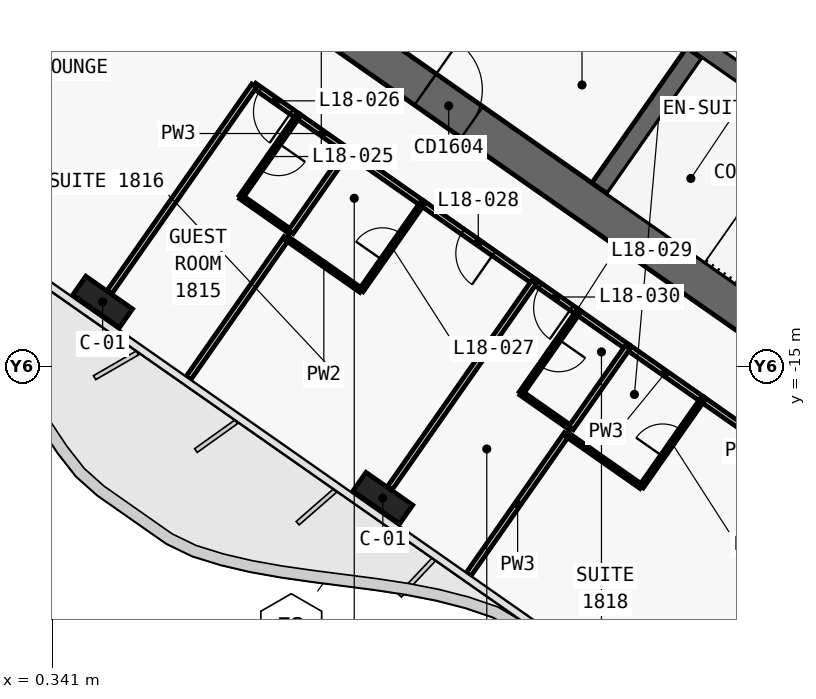
"""IFC4 building model, lengths in metres.
Left out: names, types, materials, properties, quantities, classifications, styles, units other than length and angle.
Written with IfcOpenShell. Run it as: python <this file> out.ifc"""

import sys

from ifc_helpers import new_model, si_unit, direction, frame, frame_2d, origin, origin_2d, place, context, subcontext, project, spatial, polyline, rectangle, outline, extrude, element, fill, save


model = new_model("IFC4")
c1 = context("Model", 3, precision=1e-05, world=origin(), true_north=direction((0.0, 1.0)))
c2 = subcontext(c1, "Body", "Model", "MODEL_VIEW")
j1 = project(units=[si_unit("LENGTHUNIT", "METRE"), si_unit("PLANEANGLEUNIT", "RADIAN")], contexts=[c1])
p1 = place(None, origin())
s1 = spatial("IfcSite", under=j1, at=p1, CompositionType="ELEMENT")
p2 = place(p1, origin())
s2 = spatial("IfcBuilding", under=s1, at=p2, CompositionType="ELEMENT")
p3 = place(p2, frame((0.0, 0.0, 90.5)))
s3 = spatial("IfcBuildingStorey", under=s2, at=p3, CompositionType="ELEMENT", Elevation=90.5)
p4 = place(p3, frame((-0.037, 11.867, 0.0), z_axis=(0.0, 0.0, 1.0), x_axis=(0.819155306259, -0.573571777746, 0.0)))
e1 = element("IfcWall", 1, at=p4, inside=s3, PredefinedType="SHEAR", context=c2, shape_type="SweptSolid", body=[
    extrude(outline(polyline([(33.837, 0.5), (0.0, 0.5), (0.7, -0.5), (33.837, -0.5), (33.837, 0.5)])), origin(), (0.0, 0.0, 1.0), 3.6),
])
p5 = place(p3, frame((-0.037, -0.585, 0.0), z_axis=(0.0, 0.0, 1.0), x_axis=(0.819157152511, -0.573569140985, 0.0)))
e2 = element("IfcWall", 2, at=p5, inside=s3, PredefinedType="SHEAR", context=c2, shape_type="SweptSolid", body=[
    extrude(outline(polyline([(26.695, 0.5), (0.0, 0.5), (0.7, -0.5), (26.695, -0.5), (26.695, 0.5)])), origin(), (0.0, 0.0, 1.0), 3.6),
])
p6 = place(p5, frame((1.045, 0.0, 0.0)))
e3 = element("IfcOpeningElement", 3, at=p6, cuts=e2, PredefinedType="OPENING", context=c2, shape_type="SweptSolid", body=[
    extrude(rectangle(XDim=1.5, YDim=2.1, at=frame_2d((0.75, 1.05))), frame((0.0, 0.51, 0.0), z_axis=(0.0, -1.0, 0.0), x_axis=(1.0, 0.0, 0.0)), (0.0, 0.0, 1.0), 1.02),
])
p7 = place(p5, frame((12.445, 0.0, 0.0)))
e4 = element("IfcOpeningElement", 4, at=p7, cuts=e2, PredefinedType="OPENING", context=c2, shape_type="SweptSolid", body=[
    extrude(rectangle(XDim=1.5, YDim=2.1, at=frame_2d((0.75, 1.05))), frame((0.0, 0.51, 0.0), z_axis=(0.0, -1.0, 0.0), x_axis=(1.0, 0.0, 0.0)), (0.0, 0.0, 1.0), 1.02),
])
p8 = place(p3, frame((14.745, -10.324, 0.0), z_axis=(0.0, 0.0, 1.0), x_axis=(0.57356780395, 0.819158088694, 0.0)))
e5 = element("IfcWall", 5, at=p8, inside=s3, PredefinedType="SHEAR", context=c2, shape_type="SweptSolid", body=[
    extrude(outline(polyline([(0.0, 0.25), (0.0, -0.25), (4.35, -0.25), (4.35, 0.25), (0.0, 0.25)])), origin(), (0.0, 0.0, 1.0), 3.6),
])
p9 = place(p3, frame((2.638, 3.768, 0.0), z_axis=(0.0, 0.0, 1.0), x_axis=(0.819148977158, -0.573580816643, 0.0)))
e6 = element("IfcWall", 6, at=p9, inside=s3, PredefinedType="SHEAR", context=c2, shape_type="SweptSolid", body=[
    extrude(outline(polyline([(0.0, 0.25), (0.0, -0.25), (26.0, -0.25), (26.0, 0.25), (0.0, 0.25)])), origin(), (0.0, 0.0, 1.0), 3.6),
])
p10 = place(p9, frame((9.637, 0.0, 0.0)))
e7 = element("IfcOpeningElement", 7, at=p10, cuts=e6, PredefinedType="OPENING", context=c2, shape_type="SweptSolid", body=[
    extrude(rectangle(XDim=1.2, YDim=2.1, at=frame_2d((0.6, 1.05))), frame((0.0, 0.26, 0.0), z_axis=(0.0, -1.0, 0.0), x_axis=(1.0, 0.0, 0.0)), (0.0, 0.0, 1.0), 0.52),
])
p11 = place(p9, frame((11.812, 0.0, 0.0)))
e8 = element("IfcOpeningElement", 8, at=p11, cuts=e6, PredefinedType="OPENING", context=c2, shape_type="SweptSolid", body=[
    extrude(rectangle(XDim=1.2, YDim=2.1, at=frame_2d((0.6, 1.05))), frame((0.0, 0.26, 0.0), z_axis=(0.0, -1.0, 0.0), x_axis=(1.0, 0.0, 0.0)), (0.0, 0.0, 1.0), 0.52),
])
p12 = place(p9, frame((13.988, 0.0, 0.0)))
e9 = element("IfcOpeningElement", 9, at=p12, cuts=e6, PredefinedType="OPENING", context=c2, shape_type="SweptSolid", body=[
    extrude(rectangle(XDim=1.2, YDim=2.1, at=frame_2d((0.6, 1.05))), frame((0.0, 0.26, 0.0), z_axis=(0.0, -1.0, 0.0), x_axis=(1.0, 0.0, 0.0)), (0.0, 0.0, 1.0), 0.52),
])
p13 = place(p9, frame((16.262, 0.0, 0.0)))
e10 = element("IfcOpeningElement", 10, at=p13, cuts=e6, PredefinedType="OPENING", context=c2, shape_type="SweptSolid", body=[
    extrude(rectangle(XDim=1.0, YDim=2.1, at=frame_2d((0.5, 1.05))), frame((0.0, 0.26, 0.0), z_axis=(0.0, -1.0, 0.0), x_axis=(1.0, 0.0, 0.0)), (0.0, 0.0, 1.0), 0.52),
])
for number, where, z_axis, x_axis in (
    (11, (1.665, -13.313, 0.0), (0.0, 0.0, 1.0), (0.819, -0.574, 0.0)),
    (12, (9.038, -18.475, 0.0), (0.0, 0.0, 1.0), (0.819, -0.574, 0.0)),
):
    element("IfcColumn", number, at=place(p3, frame(where, z_axis=z_axis, x_axis=x_axis)), inside=s3, PredefinedType="COLUMN", context=c2, shape_type="SweptSolid", body=[
        extrude(rectangle(XDim=1.5, YDim=0.6, at=origin_2d()), origin(), (0.0, 0.0, 1.0), 3.6),
    ])
p14 = place(p3, frame((6.799, -8.423, 0.0), z_axis=(0.0, 0.0, 1.0), x_axis=(-0.819207359301, 0.573497430219, 0.0)))
e13 = element("IfcWall", 13, at=p14, inside=s3, PredefinedType="PARTITIONING", context=c2, shape_type="SweptSolid", body=[
    extrude(rectangle(XDim=1.401, YDim=0.15, at=frame_2d((0.7, 0.0))), origin(), (0.0, 0.0, 1.0), 2.6),
])
p15 = place(p14, frame((0.201, 0.0, 0.0)))
e14 = element("IfcOpeningElement", 14, at=p15, cuts=e13, PredefinedType="OPENING", context=c2, shape_type="SweptSolid", body=[
    extrude(rectangle(XDim=1.0, YDim=2.1, at=frame_2d((0.5, 1.05))), frame((0.0, 0.085, 0.0), z_axis=(0.0, -1.0, 0.0), x_axis=(1.0, 0.0, 0.0)), (0.0, 0.0, 1.0), 0.17),
])
p16 = place(p3, frame((8.111, -9.342, 0.0), z_axis=(0.0, 0.0, 1.0), x_axis=(-0.8190674132, 0.573697283098, 0.0)))
e15 = element("IfcWall", 15, at=p16, inside=s3, PredefinedType="PARTITIONING", context=c2, shape_type="SweptSolid", body=[
    extrude(rectangle(XDim=1.604, YDim=0.15, at=frame_2d((0.802, 0.0))), origin(), (0.0, 0.0, 1.0), 3.32),
])
p17 = place(p3, frame((13.026, -12.783, 0.0), z_axis=(0.0, 0.0, 1.0), x_axis=(-0.819145961204, 0.573585123798, 0.0)))
e16 = element("IfcWall", 16, at=p17, inside=s3, PredefinedType="PARTITIONING", context=c2, shape_type="SweptSolid", body=[
    extrude(rectangle(XDim=3.603, YDim=0.15, at=frame_2d((1.802, 0.0))), origin(), (0.0, 0.0, 1.0), 2.6),
])
p18 = place(p17, frame((1.302, 0.0, 0.0)))
e17 = element("IfcOpeningElement", 17, at=p18, cuts=e16, PredefinedType="OPENING", context=c2, shape_type="SweptSolid", body=[
    extrude(rectangle(XDim=1.0, YDim=2.1, at=frame_2d((0.5, 1.05))), frame((0.0, 0.085, 0.0), z_axis=(0.0, -1.0, 0.0), x_axis=(1.0, 0.0, 0.0)), (0.0, 0.0, 1.0), 0.17),
])
p19 = place(p3, frame((10.077, -10.718, 0.0), z_axis=(0.0, 0.0, 1.0), x_axis=(-0.819146032251, 0.573585022335, 0.0)))
e18 = element("IfcWall", 18, at=p19, inside=s3, PredefinedType="PARTITIONING", context=c2, shape_type="SweptSolid", body=[
    extrude(rectangle(XDim=2.404, YDim=0.15, at=frame_2d((1.202, 0.0))), origin(), (0.0, 0.0, 1.0), 3.32),
])
p20 = place(p3, frame((14.172, -13.585, 0.0), z_axis=(0.0, 0.0, 1.0), x_axis=(-0.81914197737, 0.573590813132, 0.0)))
e19 = element("IfcWall", 19, at=p20, inside=s3, PredefinedType="PARTITIONING", context=c2, shape_type="SweptSolid", body=[
    extrude(rectangle(XDim=1.403, YDim=0.15, at=frame_2d((0.701, 0.0))), origin(), (0.0, 0.0, 1.0), 2.6),
])
p21 = place(p20, frame((0.201, 0.0, 0.0)))
e20 = element("IfcOpeningElement", 20, at=p21, cuts=e19, PredefinedType="OPENING", context=c2, shape_type="SweptSolid", body=[
    extrude(rectangle(XDim=1.0, YDim=2.1, at=frame_2d((0.5, 1.05))), frame((0.0, 0.085, 0.0), z_axis=(0.0, -1.0, 0.0), x_axis=(1.0, 0.0, 0.0)), (0.0, 0.0, 1.0), 0.17),
])
p22 = place(p3, frame((15.483, -14.504, 0.0), z_axis=(0.0, 0.0, 1.0), x_axis=(-0.819189013667, 0.573523634986, 0.0)))
e21 = element("IfcWall", 21, at=p22, inside=s3, PredefinedType="PARTITIONING", context=c2, shape_type="SweptSolid", body=[
    extrude(rectangle(XDim=1.604, YDim=0.15, at=frame_2d((0.802, 0.0))), origin(), (0.0, 0.0, 1.0), 3.32),
])
p23 = place(p3, frame((22.855, -19.666, 0.0), z_axis=(0.0, 0.0, 1.0), x_axis=(-0.819153746897, 0.573574004767, 0.0)))
e22 = element("IfcWall", 22, at=p23, inside=s3, PredefinedType="PARTITIONING", context=c2, shape_type="SweptSolid", body=[
    extrude(rectangle(XDim=6.603, YDim=0.15, at=frame_2d((3.302, 0.0))), origin(), (0.0, 0.0, 1.0), 2.6),
])
p24 = place(p23, frame((2.802, 0.0, 0.0)))
e23 = element("IfcOpeningElement", 23, at=p24, cuts=e22, PredefinedType="OPENING", context=c2, shape_type="SweptSolid", body=[
    extrude(rectangle(XDim=1.0, YDim=2.1, at=frame_2d((0.5, 1.05))), frame((0.0, 0.085, 0.0), z_axis=(0.0, -1.0, 0.0), x_axis=(1.0, 0.0, 0.0)), (0.0, 0.0, 1.0), 0.17),
])
p25 = place(p3, frame((17.449, -15.88, 0.0), z_axis=(0.0, 0.0, 1.0), x_axis=(-0.819179439794, 0.573537309527, 0.0)))
e24 = element("IfcWall", 24, at=p25, inside=s3, PredefinedType="PARTITIONING", context=c2, shape_type="SweptSolid", body=[
    extrude(rectangle(XDim=2.404, YDim=0.15, at=frame_2d((1.202, 0.0))), origin(), (0.0, 0.0, 1.0), 3.32),
])
p26 = place(p3, frame((6.798, -8.422, 0.0), z_axis=(0.0, 0.0, 1.0), x_axis=(-0.573537965655, -0.819178980414, 0.0)))
e25 = element("IfcWall", 25, at=p26, inside=s3, PredefinedType="PARTITIONING", context=c2, shape_type="SweptSolid", body=[
    extrude(rectangle(XDim=2.6, YDim=0.12, at=frame_2d((1.3, 0.0))), origin(), (0.0, 0.0, 1.0), 3.32),
])
p27 = place(p26, frame((0.875, 0.0, 0.0)))
e26 = element("IfcOpeningElement", 26, at=p27, cuts=e25, PredefinedType="OPENING", context=c2, shape_type="SweptSolid", body=[
    extrude(rectangle(XDim=0.85, YDim=2.05, at=frame_2d((0.425, 1.025))), frame((0.0, 0.07, 0.0), z_axis=(0.0, -1.0, 0.0), x_axis=(1.0, 0.0, 0.0)), (0.0, 0.0, 1.0), 0.14),
])
p28 = place(p3, frame((5.307, -10.553, 0.0), z_axis=(0.0, 0.0, 1.0), x_axis=(0.819131543282, -0.57360571371, 0.0)))
e27 = element("IfcWall", 27, at=p28, inside=s3, PredefinedType="PARTITIONING", context=c2, shape_type="SweptSolid", body=[
    extrude(rectangle(XDim=1.6, YDim=0.12, at=frame_2d((0.8, 0.0))), origin(), (0.0, 0.0, 1.0), 3.32),
])
p29 = place(p3, frame((6.504, -11.633, 0.0), z_axis=(0.0, 0.0, 1.0), x_axis=(-0.573556991349, -0.819165659482, 0.0)))
e28 = element("IfcWall", 28, at=p29, inside=s3, PredefinedType="PARTITIONING", context=c2, shape_type="SweptSolid", body=[
    extrude(rectangle(XDim=4.501, YDim=0.15, at=frame_2d((2.25, 0.0))), origin(), (0.0, 0.0, 1.0), 2.5),
])
p30 = place(p3, frame((1.849, -13.051, 0.0), z_axis=(0.0, 0.0, 1.0), x_axis=(0.57357355307, 0.819154063177, 0.0)))
e29 = element("IfcWall", 29, at=p30, inside=s3, PredefinedType="PARTITIONING", context=c2, shape_type="SweptSolid", body=[
    extrude(rectangle(XDim=6.63, YDim=0.15, at=frame_2d((3.315, 0.0))), origin(), (0.0, 0.0, 1.0), 2.6),
])
p31 = place(p3, frame((8.109, -9.34, 0.0), z_axis=(0.0, 0.0, 1.0), x_axis=(-0.573537965655, -0.819178980414, 0.0)))
e30 = element("IfcWall", 30, at=p31, inside=s3, PredefinedType="PARTITIONING", context=c2, shape_type="SweptSolid", body=[
    extrude(rectangle(XDim=2.6, YDim=0.15, at=frame_2d((1.3, 0.0))), origin(), (0.0, 0.0, 1.0), 3.32),
])
p32 = place(p3, frame((6.502, -11.635, 0.0), z_axis=(0.0, 0.0, 1.0), x_axis=(0.819141114317, -0.573592045652, 0.0)))
e31 = element("IfcWall", 31, at=p32, inside=s3, PredefinedType="PARTITIONING", context=c2, shape_type="SweptSolid", body=[
    extrude(rectangle(XDim=2.4, YDim=0.12, at=frame_2d((1.2, 0.0))), origin(), (0.0, 0.0, 1.0), 3.32),
])
p33 = place(p3, frame((8.47, -13.011, 0.0), z_axis=(0.0, 0.0, 1.0), x_axis=(0.573550118428, 0.819170471667, 0.0)))
e32 = element("IfcWall", 32, at=p33, inside=s3, PredefinedType="PARTITIONING", context=c2, shape_type="SweptSolid", body=[
    extrude(rectangle(XDim=2.8, YDim=0.12, at=frame_2d((1.4, 0.0))), origin(), (0.0, 0.0, 1.0), 3.32),
])
p34 = place(p33, frame((0.975, 0.0, 0.0)))
e33 = element("IfcOpeningElement", 33, at=p34, cuts=e32, PredefinedType="OPENING", context=c2, shape_type="SweptSolid", body=[
    extrude(rectangle(XDim=0.85, YDim=2.05, at=frame_2d((0.425, 1.025))), frame((0.0, 0.07, 0.0), z_axis=(0.0, -1.0, 0.0), x_axis=(1.0, 0.0, 0.0)), (0.0, 0.0, 1.0), 0.14),
])
p35 = place(p3, frame((13.024, -12.782, 0.0), z_axis=(0.0, 0.0, 1.0), x_axis=(-0.573556251799, -0.819166177294, 0.0)))
e34 = element("IfcWall", 34, at=p35, inside=s3, PredefinedType="PARTITIONING", context=c2, shape_type="SweptSolid", body=[
    extrude(rectangle(XDim=6.63, YDim=0.15, at=frame_2d((3.315, 0.0))), origin(), (0.0, 0.0, 1.0), 2.6),
])
p36 = place(p3, frame((14.17, -13.584, 0.0), z_axis=(0.0, 0.0, 1.0), x_axis=(-0.573537965655, -0.819178980414, 0.0)))
e35 = element("IfcWall", 35, at=p36, inside=s3, PredefinedType="PARTITIONING", context=c2, shape_type="SweptSolid", body=[
    extrude(rectangle(XDim=2.6, YDim=0.12, at=frame_2d((1.3, 0.0))), origin(), (0.0, 0.0, 1.0), 3.32),
])
p37 = place(p36, frame((0.875, 0.0, 0.0)))
e36 = element("IfcOpeningElement", 36, at=p37, cuts=e35, PredefinedType="OPENING", context=c2, shape_type="SweptSolid", body=[
    extrude(rectangle(XDim=0.85, YDim=2.05, at=frame_2d((0.425, 1.025))), frame((0.0, 0.07, 0.0), z_axis=(0.0, -1.0, 0.0), x_axis=(1.0, 0.0, 0.0)), (0.0, 0.0, 1.0), 0.14),
])
p38 = place(p3, frame((12.679, -15.716, 0.0), z_axis=(0.0, 0.0, 1.0), x_axis=(0.819131543282, -0.57360571371, 0.0)))
e37 = element("IfcWall", 37, at=p38, inside=s3, PredefinedType="PARTITIONING", context=c2, shape_type="SweptSolid", body=[
    extrude(rectangle(XDim=1.6, YDim=0.12, at=frame_2d((0.8, 0.0))), origin(), (0.0, 0.0, 1.0), 3.32),
])
p39 = place(p3, frame((13.876, -16.795, 0.0), z_axis=(0.0, 0.0, 1.0), x_axis=(-0.573556991349, -0.819165659482, 0.0)))
e38 = element("IfcWall", 38, at=p39, inside=s3, PredefinedType="PARTITIONING", context=c2, shape_type="SweptSolid", body=[
    extrude(rectangle(XDim=4.501, YDim=0.15, at=frame_2d((2.25, 0.0))), origin(), (0.0, 0.0, 1.0), 2.5),
])
p40 = place(p3, frame((15.481, -14.503, 0.0), z_axis=(0.0, 0.0, 1.0), x_axis=(-0.573582085028, -0.819148089014, 0.0)))
e39 = element("IfcWall", 39, at=p40, inside=s3, PredefinedType="PARTITIONING", context=c2, shape_type="SweptSolid", body=[
    extrude(rectangle(XDim=2.6, YDim=0.15, at=frame_2d((1.3, 0.0))), origin(), (0.0, 0.0, 1.0), 3.32),
])
p41 = place(p3, frame((13.875, -16.797, 0.0), z_axis=(0.0, 0.0, 1.0), x_axis=(0.819155442668, -0.573571582932, 0.0)))
e40 = element("IfcWall", 40, at=p41, inside=s3, PredefinedType="PARTITIONING", context=c2, shape_type="SweptSolid", body=[
    extrude(rectangle(XDim=2.4, YDim=0.12, at=frame_2d((1.2, 0.0))), origin(), (0.0, 0.0, 1.0), 3.32),
])
p42 = place(p3, frame((15.842, -18.173, 0.0), z_axis=(0.0, 0.0, 1.0), x_axis=(0.573550118428, 0.819170471667, 0.0)))
e41 = element("IfcWall", 41, at=p42, inside=s3, PredefinedType="PARTITIONING", context=c2, shape_type="SweptSolid", body=[
    extrude(rectangle(XDim=2.8, YDim=0.12, at=frame_2d((1.4, 0.0))), origin(), (0.0, 0.0, 1.0), 3.32),
])
p43 = place(p42, frame((0.975, 0.0, 0.0)))
e42 = element("IfcOpeningElement", 42, at=p43, cuts=e41, PredefinedType="OPENING", context=c2, shape_type="SweptSolid", body=[
    extrude(rectangle(XDim=0.85, YDim=2.05, at=frame_2d((0.425, 1.025))), frame((0.0, 0.07, 0.0), z_axis=(0.0, -1.0, 0.0), x_axis=(1.0, 0.0, 0.0)), (0.0, 0.0, 1.0), 0.14),
])
p44 = place(p7, origin())
e43 = element("IfcDoor", 43, at=p44, inside=s3, OperationType="DOUBLE_DOOR_SINGLE_SWING", PredefinedType="DOOR", context=c2, shape_type="SweptSolid", body=[
    extrude(rectangle(XDim=1.5, YDim=2.1, at=frame_2d((0.75, 1.05))), frame((0.0, 0.025, 0.0), z_axis=(0.0, -1.0, 0.0), x_axis=(1.0, 0.0, 0.0)), (0.0, 0.0, 1.0), 0.05),
])
fill(e4, e43)
p45 = place(p27, origin())
e44 = element("IfcDoor", 44, at=p45, inside=s3, OperationType="SINGLE_SWING_RIGHT", PredefinedType="DOOR", context=c2, shape_type="SweptSolid", body=[
    extrude(rectangle(XDim=0.85, YDim=2.05, at=frame_2d((0.425, 1.025))), frame((0.0, 0.025, 0.0), z_axis=(0.0, -1.0, 0.0), x_axis=(1.0, 0.0, 0.0)), (0.0, 0.0, 1.0), 0.05),
])
fill(e26, e44)
p46 = place(p15, origin())
e45 = element("IfcDoor", 45, at=p46, inside=s3, OperationType="SINGLE_SWING_LEFT", PredefinedType="DOOR", context=c2, shape_type="SweptSolid", body=[
    extrude(rectangle(XDim=1.0, YDim=2.1, at=frame_2d((0.5, 1.05))), frame((0.0, 0.025, 0.0), z_axis=(0.0, -1.0, 0.0), x_axis=(1.0, 0.0, 0.0)), (0.0, 0.0, 1.0), 0.05),
])
fill(e14, e45)
p47 = place(p34, origin())
e46 = element("IfcDoor", 46, at=p47, inside=s3, OperationType="SINGLE_SWING_LEFT", PredefinedType="DOOR", context=c2, shape_type="SweptSolid", body=[
    extrude(rectangle(XDim=0.85, YDim=2.05, at=frame_2d((0.425, 1.025))), frame((0.0, 0.025, 0.0), z_axis=(0.0, -1.0, 0.0), x_axis=(1.0, 0.0, 0.0)), (0.0, 0.0, 1.0), 0.05),
])
fill(e33, e46)
p48 = place(p18, origin())
e47 = element("IfcDoor", 47, at=p48, inside=s3, OperationType="SINGLE_SWING_RIGHT", PredefinedType="DOOR", context=c2, shape_type="SweptSolid", body=[
    extrude(rectangle(XDim=1.0, YDim=2.1, at=frame_2d((0.5, 1.05))), frame((0.0, 0.025, 0.0), z_axis=(0.0, -1.0, 0.0), x_axis=(1.0, 0.0, 0.0)), (0.0, 0.0, 1.0), 0.05),
])
fill(e17, e47)
p49 = place(p37, origin())
e48 = element("IfcDoor", 48, at=p49, inside=s3, OperationType="SINGLE_SWING_RIGHT", PredefinedType="DOOR", context=c2, shape_type="SweptSolid", body=[
    extrude(rectangle(XDim=0.85, YDim=2.05, at=frame_2d((0.425, 1.025))), frame((0.0, 0.025, 0.0), z_axis=(0.0, -1.0, 0.0), x_axis=(1.0, 0.0, 0.0)), (0.0, 0.0, 1.0), 0.05),
])
fill(e36, e48)
p50 = place(p21, origin())
e49 = element("IfcDoor", 49, at=p50, inside=s3, OperationType="SINGLE_SWING_LEFT", PredefinedType="DOOR", context=c2, shape_type="SweptSolid", body=[
    extrude(rectangle(XDim=1.0, YDim=2.1, at=frame_2d((0.5, 1.05))), frame((0.0, 0.025, 0.0), z_axis=(0.0, -1.0, 0.0), x_axis=(1.0, 0.0, 0.0)), (0.0, 0.0, 1.0), 0.05),
])
fill(e20, e49)
p51 = place(p43, origin())
e50 = element("IfcDoor", 50, at=p51, inside=s3, OperationType="SINGLE_SWING_LEFT", PredefinedType="DOOR", context=c2, shape_type="SweptSolid", body=[
    extrude(rectangle(XDim=0.85, YDim=2.05, at=frame_2d((0.425, 1.025))), frame((0.0, 0.025, 0.0), z_axis=(0.0, -1.0, 0.0), x_axis=(1.0, 0.0, 0.0)), (0.0, 0.0, 1.0), 0.05),
])
fill(e42, e50)
save(model, sys.argv[1])
